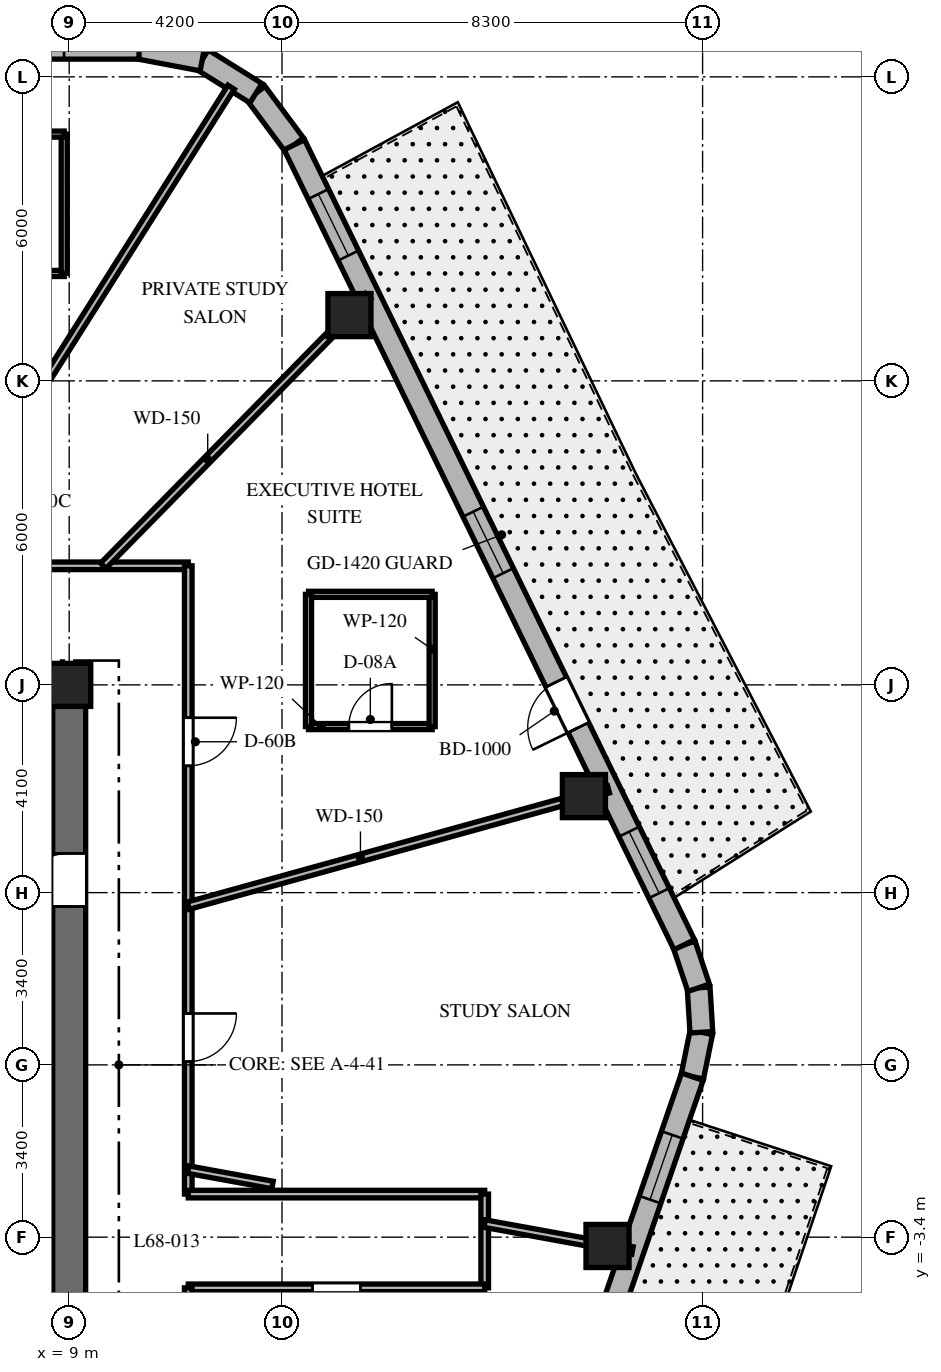
"""IFC4 building model, lengths in metres.
Left out: names, types, materials, properties, quantities, classifications, styles, units other than length and angle.
Written with IfcOpenShell. Run it as: python <this file> out.ifc"""

import sys

from ifc_helpers import new_model, si_unit, direction, frame, frame_2d, origin, origin_2d, place, context, subcontext, project, spatial, rectangle, extrude, element, fill, save


model = new_model("IFC4")
c1 = context("Model", 3, precision=1e-05, world=origin(), true_north=direction((0.0, 1.0)))
c2 = subcontext(c1, "Body", "Model", "MODEL_VIEW")
j1 = project(units=[si_unit("LENGTHUNIT", "METRE"), si_unit("PLANEANGLEUNIT", "RADIAN")], contexts=[c1])
p1 = place(None, origin())
s1 = spatial("IfcSite", under=j1, at=p1, CompositionType="ELEMENT")
p2 = place(p1, origin())
s2 = spatial("IfcBuilding", under=s1, at=p2, CompositionType="ELEMENT")
p3 = place(p2, frame((0.0, 0.0, 273.0)))
s3 = spatial("IfcBuildingStorey", under=s2, at=p3, CompositionType="ELEMENT", Elevation=273.0)
p4 = place(p3, frame((1.85, 7.5, 0.0), z_axis=(0.0, 0.0, 1.0), x_axis=(1.0, 0.0, 0.0)))
e1 = element("IfcWall", 1, at=p4, inside=s3, PredefinedType="SHEAR", context=c2, shape_type="SweptSolid", body=[
    extrude(rectangle(XDim=7.475, YDim=0.65, at=frame_2d((3.737, 0.0))), origin(), (0.0, 0.0, 1.0), 3.9),
])
p5 = place(p3, frame((9.0, -7.175, 0.0), z_axis=(0.0, 0.0, 1.0), x_axis=(0.0, 1.0, 0.0)))
e2 = element("IfcWall", 2, at=p5, inside=s3, PredefinedType="SHEAR", context=c2, shape_type="SweptSolid", body=[
    extrude(rectangle(XDim=14.35, YDim=0.65, at=frame_2d((7.175, 0.0))), origin(), (0.0, 0.0, 1.0), 3.9),
])
p6 = place(p5, frame((10.3, 0.0, 0.0)))
e3 = element("IfcOpeningElement", 3, at=p6, cuts=e2, PredefinedType="OPENING", context=c2, shape_type="SweptSolid", body=[
    extrude(rectangle(XDim=1.05, YDim=2.15, at=frame_2d((0.525, 1.075))), frame((0.0, 0.335, 0.0), z_axis=(0.0, -1.0, 0.0), x_axis=(1.0, 0.0, 0.0)), (0.0, 0.0, 1.0), 0.67),
])
for number, where, z_axis, x_axis in (
    (4, (9.0, 7.5, 0.0), (0.0, 0.0, 1.0), (1.0, 0.0, 0.0)),
    (5, (19.624, -3.574, 0.0), (0.0, 0.0, 1.0), (1.0, 0.0, 0.0)),
    (6, (19.158, 5.305, 0.0), (0.0, 0.0, 1.0), (1.0, 0.0, 0.0)),
    (7, (14.531, 14.798, 0.0), (0.0, 0.0, 1.0), (1.0, 0.0, 0.0)),
):
    element("IfcColumn", number, at=place(p3, frame(where, z_axis=z_axis, x_axis=x_axis)), inside=s3, PredefinedType="COLUMN", context=c2, shape_type="SweptSolid", body=[
        extrude(rectangle(XDim=0.85, YDim=0.85, at=origin_2d()), origin(), (0.0, 0.0, 1.0), 3.9),
    ])
p7 = place(p3, frame((21.298, -0.233, 0.0), z_axis=(0.0, 0.0, 1.0), x_axis=(0.199158176661, 0.979967356941, 0.0)))
e8 = element("IfcWall", 8, at=p7, inside=s3, PredefinedType="SOLIDWALL", context=c2, shape_type="SweptSolid", body=[
    extrude(rectangle(XDim=0.895, YDim=0.45, at=frame_2d((0.447, 0.0))), origin(), (0.0, 0.0, 1.0), 3.6),
])
p8 = place(p3, frame((21.476, 0.644, 0.0), z_axis=(0.0, 0.0, 1.0), x_axis=(-0.061031097918, 0.998135865044, 0.0)))
e9 = element("IfcWall", 9, at=p8, inside=s3, PredefinedType="SOLIDWALL", context=c2, shape_type="SweptSolid", body=[
    extrude(rectangle(XDim=0.88, YDim=0.45, at=frame_2d((0.44, 0.0))), origin(), (0.0, 0.0, 1.0), 3.6),
])
p9 = place(p3, frame((21.422, 1.522, 0.0), z_axis=(0.0, 0.0, 1.0), x_axis=(-0.316964162323, 0.94843751497, 0.0)))
e10 = element("IfcWall", 10, at=p9, inside=s3, PredefinedType="SOLIDWALL", context=c2, shape_type="SweptSolid", body=[
    extrude(rectangle(XDim=0.895, YDim=0.45, at=frame_2d((0.448, 0.0))), origin(), (0.0, 0.0, 1.0), 3.6),
])
p10 = place(p3, frame((13.443, 18.16, 0.0), z_axis=(0.0, 0.0, 1.0), x_axis=(-0.597042425808, 0.802209661987, 0.0)))
e11 = element("IfcWall", 11, at=p10, inside=s3, PredefinedType="SOLIDWALL", context=c2, shape_type="SweptSolid", body=[
    extrude(rectangle(XDim=1.27, YDim=0.45, at=frame_2d((0.635, 0.0))), origin(), (0.0, 0.0, 1.0), 3.6),
])
p11 = place(p3, frame((12.685, 19.178, 0.0), z_axis=(0.0, 0.0, 1.0), x_axis=(-0.848031272749, 0.529946186362, 0.0)))
e12 = element("IfcWall", 12, at=p11, inside=s3, PredefinedType="SOLIDWALL", context=c2, shape_type="SweptSolid", body=[
    extrude(rectangle(XDim=1.248, YDim=0.45, at=frame_2d((0.624, 0.0))), origin(), (0.0, 0.0, 1.0), 3.6),
])
p12 = place(p3, frame((11.626, 19.84, 0.0), z_axis=(0.0, 0.0, 1.0), x_axis=(-0.982701956681, 0.185194126083, 0.0)))
e13 = element("IfcWall", 13, at=p12, inside=s3, PredefinedType="SOLIDWALL", context=c2, shape_type="SweptSolid", body=[
    extrude(rectangle(XDim=1.27, YDim=0.45, at=frame_2d((0.635, 0.0))), origin(), (0.0, 0.0, 1.0), 3.6),
])
p13 = place(p3, frame((15.26, -17.776, 0.0), z_axis=(0.0, 0.0, 1.0), x_axis=(0.325407437101, 0.945573899745, 0.0)))
e14 = element("IfcWall", 14, at=p13, inside=s3, PredefinedType="SOLIDWALL", context=c2, shape_type="SweptSolid", body=[
    extrude(rectangle(XDim=18.552, YDim=0.45, at=frame_2d((9.276, 0.0))), origin(), (0.0, 0.0, 1.0), 3.6),
])
p14 = place(p13, frame((4.602, 0.0, 0.0)))
e15 = element("IfcOpeningElement", 15, at=p14, cuts=e14, PredefinedType="OPENING", context=c2, shape_type="SweptSolid", body=[
    extrude(rectangle(XDim=0.95, YDim=2.15, at=frame_2d((0.475, 1.075))), frame((0.0, 0.235, 0.0), z_axis=(0.0, -1.0, 0.0), x_axis=(1.0, 0.0, 0.0)), (0.0, 0.0, 1.0), 0.47),
])
p15 = place(p13, frame((1.161, 0.0, 0.8)))
e16 = element("IfcOpeningElement", 16, at=p15, cuts=e14, PredefinedType="OPENING", context=c2, shape_type="SweptSolid", body=[
    extrude(rectangle(XDim=1.35, YDim=1.75, at=frame_2d((0.675, 0.875))), frame((0.0, 0.235, 0.0), z_axis=(0.0, -1.0, 0.0), x_axis=(1.0, 0.0, 0.0)), (0.0, 0.0, 1.0), 0.47),
])
p16 = place(p13, frame((8.548, 0.0, 0.8)))
e17 = element("IfcOpeningElement", 17, at=p16, cuts=e14, PredefinedType="OPENING", context=c2, shape_type="SweptSolid", body=[
    extrude(rectangle(XDim=1.35, YDim=1.75, at=frame_2d((0.675, 0.875))), frame((0.0, 0.235, 0.0), z_axis=(0.0, -1.0, 0.0), x_axis=(1.0, 0.0, 0.0)), (0.0, 0.0, 1.0), 0.47),
])
p17 = place(p13, frame((15.987, 0.0, 0.8)))
e18 = element("IfcOpeningElement", 18, at=p17, cuts=e14, PredefinedType="OPENING", context=c2, shape_type="SweptSolid", body=[
    extrude(rectangle(XDim=1.35, YDim=1.75, at=frame_2d((0.675, 0.875))), frame((0.0, 0.235, 0.0), z_axis=(0.0, -1.0, 0.0), x_axis=(1.0, 0.0, 0.0)), (0.0, 0.0, 1.0), 0.47),
])
p18 = place(p3, frame((21.138, 2.371, 0.0), z_axis=(0.0, 0.0, 1.0), x_axis=(-0.438128124058, 0.89891253574, 0.0)))
e19 = element("IfcWall", 19, at=p18, inside=s3, PredefinedType="SOLIDWALL", context=c2, shape_type="SweptSolid", body=[
    extrude(rectangle(XDim=17.565, YDim=0.45, at=frame_2d((8.782, 0.0))), origin(), (0.0, 0.0, 1.0), 3.6),
])
p19 = place(p18, frame((4.769, 0.0, 0.0)))
e20 = element("IfcOpeningElement", 20, at=p19, cuts=e19, PredefinedType="OPENING", context=c2, shape_type="SweptSolid", body=[
    extrude(rectangle(XDim=1.0, YDim=2.15, at=frame_2d((0.5, 1.075))), frame((0.0, 0.235, 0.0), z_axis=(0.0, -1.0, 0.0), x_axis=(1.0, 0.0, 0.0)), (0.0, 0.0, 1.0), 0.47),
])
p20 = place(p18, frame((8.158, 0.0, 0.8)))
e21 = element("IfcOpeningElement", 21, at=p20, cuts=e19, PredefinedType="OPENING", context=c2, shape_type="SweptSolid", body=[
    extrude(rectangle(XDim=1.35, YDim=1.75, at=frame_2d((0.675, 0.875))), frame((0.0, 0.235, 0.0), z_axis=(0.0, -1.0, 0.0), x_axis=(1.0, 0.0, 0.0)), (0.0, 0.0, 1.0), 0.47),
])
p21 = place(p18, frame((15.132, 0.0, 0.8)))
e22 = element("IfcOpeningElement", 22, at=p21, cuts=e19, PredefinedType="OPENING", context=c2, shape_type="SweptSolid", body=[
    extrude(rectangle(XDim=1.35, YDim=1.75, at=frame_2d((0.675, 0.875))), frame((0.0, 0.235, 0.0), z_axis=(0.0, -1.0, 0.0), x_axis=(1.0, 0.0, 0.0)), (0.0, 0.0, 1.0), 0.47),
])
p22 = place(p18, frame((1.133, 0.0, 0.8)))
e23 = element("IfcOpeningElement", 23, at=p22, cuts=e19, PredefinedType="OPENING", context=c2, shape_type="SweptSolid", body=[
    extrude(rectangle(XDim=1.35, YDim=1.75, at=frame_2d((0.675, 0.875))), frame((0.0, 0.235, 0.0), z_axis=(0.0, -1.0, 0.0), x_axis=(1.0, 0.0, 0.0)), (0.0, 0.0, 1.0), 0.47),
])
p23 = place(p3, frame((10.379, 20.075, 0.0), z_axis=(0.0, 0.0, 1.0), x_axis=(-1.0, 0.0, 0.0)))
e24 = element("IfcWall", 24, at=p23, inside=s3, PredefinedType="SOLIDWALL", context=c2, shape_type="SweptSolid", body=[
    extrude(rectangle(XDim=22.417, YDim=0.45, at=frame_2d((11.208, 0.0))), origin(), (0.0, 0.0, 1.0), 3.6),
])
p24 = place(p23, frame((1.48, 0.0, 0.8)))
e25 = element("IfcOpeningElement", 25, at=p24, cuts=e24, PredefinedType="OPENING", context=c2, shape_type="SweptSolid", body=[
    extrude(rectangle(XDim=1.35, YDim=1.75, at=frame_2d((0.675, 0.875))), frame((0.0, 0.235, 0.0), z_axis=(0.0, -1.0, 0.0), x_axis=(1.0, 0.0, 0.0)), (0.0, 0.0, 1.0), 0.47),
])
p25 = place(p23, frame((10.534, 0.0, 0.8)))
e26 = element("IfcOpeningElement", 26, at=p25, cuts=e24, PredefinedType="OPENING", context=c2, shape_type="SweptSolid", body=[
    extrude(rectangle(XDim=1.35, YDim=1.75, at=frame_2d((0.675, 0.875))), frame((0.0, 0.235, 0.0), z_axis=(0.0, -1.0, 0.0), x_axis=(1.0, 0.0, 0.0)), (0.0, 0.0, 1.0), 0.47),
])
p26 = place(p23, frame((19.587, 0.0, 0.8)))
e27 = element("IfcOpeningElement", 27, at=p26, cuts=e24, PredefinedType="OPENING", context=c2, shape_type="SweptSolid", body=[
    extrude(rectangle(XDim=1.35, YDim=1.75, at=frame_2d((0.675, 0.875))), frame((0.0, 0.235, 0.0), z_axis=(0.0, -1.0, 0.0), x_axis=(1.0, 0.0, 0.0)), (0.0, 0.0, 1.0), 0.47),
])
p27 = place(p3, frame((0.92, 9.85, 0.0), z_axis=(0.0, 0.0, 1.0), x_axis=(1.0, 0.0, 0.0)))
e28 = element("IfcWall", 28, at=p27, inside=s3, PredefinedType="PARTITIONING", context=c2, shape_type="SweptSolid", body=[
    extrude(rectangle(XDim=10.43, YDim=0.15, at=frame_2d((5.215, 0.0))), origin(), (0.0, 0.0, 1.0), 3.09),
])
p28 = place(p27, frame((6.627, 0.0, 0.0)))
e29 = element("IfcOpeningElement", 29, at=p28, cuts=e28, PredefinedType="OPENING", context=c2, shape_type="SweptSolid", body=[
    extrude(rectangle(XDim=0.9, YDim=2.03, at=frame_2d((0.45, 1.015))), frame((0.0, 0.085, 0.0), z_axis=(0.0, -1.0, 0.0), x_axis=(1.0, 0.0, 0.0)), (0.0, 0.0, 1.0), 0.17),
])
p29 = place(p27, frame((3.226, 0.0, 0.0)))
e30 = element("IfcOpeningElement", 30, at=p29, cuts=e28, PredefinedType="OPENING", context=c2, shape_type="SweptSolid", body=[
    extrude(rectangle(XDim=0.95, YDim=2.03, at=frame_2d((0.475, 1.015))), frame((0.0, 0.085, 0.0), z_axis=(0.0, -1.0, 0.0), x_axis=(1.0, 0.0, 0.0)), (0.0, 0.0, 1.0), 0.17),
])
p30 = place(p3, frame((11.35, 9.85, 0.0), z_axis=(0.0, 0.0, 1.0), x_axis=(0.0, -1.0, 0.0)))
e31 = element("IfcWall", 31, at=p30, inside=s3, PredefinedType="PARTITIONING", context=c2, shape_type="SweptSolid", body=[
    extrude(rectangle(XDim=12.4, YDim=0.15, at=frame_2d((6.2, 0.0))), origin(), (0.0, 0.0, 1.0), 3.09),
])
p31 = place(p30, frame((2.998, 0.0, 0.0)))
e32 = element("IfcOpeningElement", 32, at=p31, cuts=e31, PredefinedType="OPENING", context=c2, shape_type="SweptSolid", body=[
    extrude(rectangle(XDim=0.95, YDim=2.03, at=frame_2d((0.475, 1.015))), frame((0.0, 0.085, 0.0), z_axis=(0.0, -1.0, 0.0), x_axis=(1.0, 0.0, 0.0)), (0.0, 0.0, 1.0), 0.17),
])
p32 = place(p30, frame((8.835, 0.0, 0.0)))
e33 = element("IfcOpeningElement", 33, at=p32, cuts=e31, PredefinedType="OPENING", context=c2, shape_type="SweptSolid", body=[
    extrude(rectangle(XDim=0.95, YDim=2.03, at=frame_2d((0.475, 1.015))), frame((0.0, 0.085, 0.0), z_axis=(0.0, -1.0, 0.0), x_axis=(1.0, 0.0, 0.0)), (0.0, 0.0, 1.0), 0.17),
])
p33 = place(p3, frame((11.35, -2.55, 0.0), z_axis=(0.0, 0.0, 1.0), x_axis=(1.0, 0.0, 0.0)))
e34 = element("IfcWall", 34, at=p33, inside=s3, PredefinedType="PARTITIONING", context=c2, shape_type="SweptSolid", body=[
    extrude(rectangle(XDim=5.85, YDim=0.15, at=frame_2d((2.925, 0.0))), origin(), (0.0, 0.0, 1.0), 3.041),
])
p34 = place(p3, frame((17.2, -2.55, 0.0), z_axis=(0.0, 0.0, 1.0), x_axis=(0.0, -1.0, 0.0)))
e35 = element("IfcWall", 35, at=p34, inside=s3, PredefinedType="PARTITIONING", context=c2, shape_type="SweptSolid", body=[
    extrude(rectangle(XDim=1.85, YDim=0.15, at=frame_2d((0.925, 0.0))), origin(), (0.0, 0.0, 1.0), 3.09),
])
p35 = place(p3, frame((17.2, -4.4, 0.0), z_axis=(0.0, 0.0, 1.0), x_axis=(-1.0, 0.0, 0.0)))
e36 = element("IfcWall", 36, at=p35, inside=s3, PredefinedType="PARTITIONING", context=c2, shape_type="SweptSolid", body=[
    extrude(rectangle(XDim=5.85, YDim=0.15, at=frame_2d((2.925, 0.0))), origin(), (0.0, 0.0, 1.0), 3.041),
])
p36 = place(p35, frame((2.45, 0.0, 0.0)))
e37 = element("IfcOpeningElement", 37, at=p36, cuts=e36, PredefinedType="OPENING", context=c2, shape_type="SweptSolid", body=[
    extrude(rectangle(XDim=0.95, YDim=2.03, at=frame_2d((0.475, 1.015))), frame((0.0, 0.085, 0.0), z_axis=(0.0, -1.0, 0.0), x_axis=(1.0, 0.0, 0.0)), (0.0, 0.0, 1.0), 0.17),
])
p37 = place(p3, frame((11.35, -4.4, 0.0), z_axis=(0.0, 0.0, 1.0), x_axis=(0.0, -1.0, 0.0)))
e38 = element("IfcWall", 38, at=p37, inside=s3, PredefinedType="PARTITIONING", context=c2, shape_type="SweptSolid", body=[
    extrude(rectangle(XDim=5.45, YDim=0.15, at=frame_2d((2.725, 0.0))), origin(), (0.0, 0.0, 1.0), 3.09),
])
p38 = place(p3, frame((11.35, 3.143, 0.0), z_axis=(0.0, 0.0, 1.0), x_axis=(0.963731818141, 0.266872596386, 0.0)))
e39 = element("IfcWall", 39, at=p38, inside=s3, PredefinedType="PARTITIONING", context=c2, shape_type="SweptSolid", body=[
    extrude(rectangle(XDim=8.605, YDim=0.15, at=frame_2d((4.302, 0.0))), origin(), (0.0, 0.0, 1.0), 2.94),
])
p39 = place(p3, frame((9.672, 9.85, 0.0), z_axis=(0.0, 0.0, 1.0), x_axis=(0.700629771301, 0.713524998558, 0.0)))
e40 = element("IfcWall", 40, at=p39, inside=s3, PredefinedType="PARTITIONING", context=c2, shape_type="SweptSolid", body=[
    extrude(rectangle(XDim=7.459, YDim=0.15, at=frame_2d((3.73, 0.0))), origin(), (0.0, 0.0, 1.0), 2.94),
])
p40 = place(p3, frame((6.226, 9.85, 0.0), z_axis=(0.0, 0.0, 1.0), x_axis=(0.53429711317, 0.845296749584, 0.0)))
e41 = element("IfcWall", 41, at=p40, inside=s3, PredefinedType="PARTITIONING", context=c2, shape_type="SweptSolid", body=[
    extrude(rectangle(XDim=11.174, YDim=0.15, at=frame_2d((5.587, 0.0))), origin(), (0.0, 0.0, 1.0), 2.94),
])
p41 = place(p3, frame((11.35, -2.067, 0.0), z_axis=(0.0, 0.0, 1.0), x_axis=(0.983807459651, -0.179228575665, 0.0)))
e42 = element("IfcWall", 42, at=p41, inside=s3, PredefinedType="PARTITIONING", context=c2, shape_type="SweptSolid", body=[
    extrude(rectangle(XDim=1.69, YDim=0.15, at=frame_2d((0.845, 0.0))), origin(), (0.0, 0.0, 1.0), 3.6),
])
p42 = place(p3, frame((17.2, -3.133, 0.0), z_axis=(0.0, 0.0, 1.0), x_axis=(0.983817168797, -0.179175272791, 0.0)))
e43 = element("IfcWall", 43, at=p42, inside=s3, PredefinedType="PARTITIONING", context=c2, shape_type="SweptSolid", body=[
    extrude(rectangle(XDim=2.965, YDim=0.15, at=frame_2d((1.482, 0.0))), origin(), (0.0, 0.0, 1.0), 2.94),
])
p43 = place(p3, frame((13.723, 6.677, 0.0), z_axis=(0.0, 0.0, 1.0), x_axis=(1.0, 0.0, 0.0)))
e44 = element("IfcWall", 44, at=p43, inside=s3, PredefinedType="PARTITIONING", context=c2, shape_type="SweptSolid", body=[
    extrude(rectangle(XDim=2.44, YDim=0.12, at=frame_2d((1.22, 0.0))), origin(), (0.0, 0.0, 1.0), 3.126),
])
p44 = place(p43, frame((0.795, 0.0, 0.0)))
e45 = element("IfcOpeningElement", 45, at=p44, cuts=e44, PredefinedType="OPENING", context=c2, shape_type="SweptSolid", body=[
    extrude(rectangle(XDim=0.85, YDim=2.03, at=frame_2d((0.425, 1.015))), frame((0.0, 0.07, 0.0), z_axis=(0.0, -1.0, 0.0), x_axis=(1.0, 0.0, 0.0)), (0.0, 0.0, 1.0), 0.14),
])
p45 = place(p3, frame((16.163, 6.677, 0.0), z_axis=(0.0, 0.0, 1.0), x_axis=(0.0, 1.0, 0.0)))
e46 = element("IfcWall", 46, at=p45, inside=s3, PredefinedType="PARTITIONING", context=c2, shape_type="SweptSolid", body=[
    extrude(rectangle(XDim=2.61, YDim=0.12, at=frame_2d((1.305, 0.0))), origin(), (0.0, 0.0, 1.0), 3.6),
])
p46 = place(p3, frame((16.163, 9.287, 0.0), z_axis=(0.0, 0.0, 1.0), x_axis=(-1.0, 0.0, 0.0)))
e47 = element("IfcWall", 47, at=p46, inside=s3, PredefinedType="PARTITIONING", context=c2, shape_type="SweptSolid", body=[
    extrude(rectangle(XDim=2.44, YDim=0.12, at=frame_2d((1.22, 0.0))), origin(), (0.0, 0.0, 1.0), 3.126),
])
p47 = place(p3, frame((13.723, 9.287, 0.0), z_axis=(0.0, 0.0, 1.0), x_axis=(0.0, -1.0, 0.0)))
e48 = element("IfcWall", 48, at=p47, inside=s3, PredefinedType="PARTITIONING", context=c2, shape_type="SweptSolid", body=[
    extrude(rectangle(XDim=2.61, YDim=0.12, at=frame_2d((1.305, 0.0))), origin(), (0.0, 0.0, 1.0), 3.6),
])
p48 = place(p3, frame((6.302, 15.62, 0.0), z_axis=(0.0, 0.0, 1.0), x_axis=(1.0, 0.0, 0.0)))
e49 = element("IfcWall", 49, at=p48, inside=s3, PredefinedType="PARTITIONING", context=c2, shape_type="SweptSolid", body=[
    extrude(rectangle(XDim=2.6, YDim=0.12, at=frame_2d((1.3, 0.0))), origin(), (0.0, 0.0, 1.0), 3.6),
])
p49 = place(p48, frame((0.875, 0.0, 0.0)))
e50 = element("IfcOpeningElement", 50, at=p49, cuts=e49, PredefinedType="OPENING", context=c2, shape_type="SweptSolid", body=[
    extrude(rectangle(XDim=0.85, YDim=2.03, at=frame_2d((0.425, 1.015))), frame((0.0, 0.07, 0.0), z_axis=(0.0, -1.0, 0.0), x_axis=(1.0, 0.0, 0.0)), (0.0, 0.0, 1.0), 0.14),
])
p50 = place(p3, frame((8.902, 15.62, 0.0), z_axis=(0.0, 0.0, 1.0), x_axis=(0.0, 1.0, 0.0)))
e51 = element("IfcWall", 51, at=p50, inside=s3, PredefinedType="PARTITIONING", context=c2, shape_type="SweptSolid", body=[
    extrude(rectangle(XDim=2.75, YDim=0.12, at=frame_2d((1.375, 0.0))), origin(), (0.0, 0.0, 1.0), 2.94),
])
p51 = place(p3, frame((8.902, 18.37, 0.0), z_axis=(0.0, 0.0, 1.0), x_axis=(-1.0, 0.0, 0.0)))
e52 = element("IfcWall", 52, at=p51, inside=s3, PredefinedType="PARTITIONING", context=c2, shape_type="SweptSolid", body=[
    extrude(rectangle(XDim=2.6, YDim=0.12, at=frame_2d((1.3, 0.0))), origin(), (0.0, 0.0, 1.0), 2.94),
])
p52 = place(p17, origin())
e53 = element("IfcWindow", 53, at=p52, inside=s3, PartitioningType="SINGLE_PANEL", PredefinedType="WINDOW", context=c2, shape_type="SweptSolid", body=[
    extrude(rectangle(XDim=1.35, YDim=1.75, at=frame_2d((0.675, 0.875))), frame((0.0, 0.03, 0.0), z_axis=(0.0, -1.0, 0.0), x_axis=(1.0, 0.0, 0.0)), (0.0, 0.0, 1.0), 0.06),
])
fill(e18, e53)
p53 = place(p19, origin())
e54 = element("IfcDoor", 54, at=p53, inside=s3, OperationType="SINGLE_SWING_LEFT", PredefinedType="DOOR", context=c2, shape_type="SweptSolid", body=[
    extrude(rectangle(XDim=1.0, YDim=2.15, at=frame_2d((0.5, 1.075))), frame((0.0, 0.025, 0.0), z_axis=(0.0, -1.0, 0.0), x_axis=(1.0, 0.0, 0.0)), (0.0, 0.0, 1.0), 0.05),
])
fill(e20, e54)
p54 = place(p20, origin())
e55 = element("IfcWindow", 55, at=p54, inside=s3, PartitioningType="SINGLE_PANEL", PredefinedType="WINDOW", context=c2, shape_type="SweptSolid", body=[
    extrude(rectangle(XDim=1.35, YDim=1.75, at=frame_2d((0.675, 0.875))), frame((0.0, 0.03, 0.0), z_axis=(0.0, -1.0, 0.0), x_axis=(1.0, 0.0, 0.0)), (0.0, 0.0, 1.0), 0.06),
])
fill(e21, e55)
p55 = place(p21, origin())
e56 = element("IfcWindow", 56, at=p55, inside=s3, PartitioningType="SINGLE_PANEL", PredefinedType="WINDOW", context=c2, shape_type="SweptSolid", body=[
    extrude(rectangle(XDim=1.35, YDim=1.75, at=frame_2d((0.675, 0.875))), frame((0.0, 0.03, 0.0), z_axis=(0.0, -1.0, 0.0), x_axis=(1.0, 0.0, 0.0)), (0.0, 0.0, 1.0), 0.06),
])
fill(e22, e56)
p56 = place(p22, origin())
e57 = element("IfcWindow", 57, at=p56, inside=s3, PartitioningType="SINGLE_PANEL", PredefinedType="WINDOW", context=c2, shape_type="SweptSolid", body=[
    extrude(rectangle(XDim=1.35, YDim=1.75, at=frame_2d((0.675, 0.875))), frame((0.0, 0.03, 0.0), z_axis=(0.0, -1.0, 0.0), x_axis=(1.0, 0.0, 0.0)), (0.0, 0.0, 1.0), 0.06),
])
fill(e23, e57)
p57 = place(p6, origin())
e58 = element("IfcDoor", 58, at=p57, inside=s3, OperationType="SINGLE_SWING_LEFT", PredefinedType="DOOR", context=c2, shape_type="SweptSolid", body=[
    extrude(rectangle(XDim=1.05, YDim=2.15, at=frame_2d((0.525, 1.075))), frame((0.0, 0.025, 0.0), z_axis=(0.0, -1.0, 0.0), x_axis=(1.0, 0.0, 0.0)), (0.0, 0.0, 1.0), 0.05),
])
fill(e3, e58)
p58 = place(p31, origin())
e59 = element("IfcDoor", 59, at=p58, inside=s3, OperationType="SINGLE_SWING_LEFT", PredefinedType="DOOR", context=c2, shape_type="SweptSolid", body=[
    extrude(rectangle(XDim=0.95, YDim=2.03, at=frame_2d((0.475, 1.015))), frame((0.0, 0.025, 0.0), z_axis=(0.0, -1.0, 0.0), x_axis=(1.0, 0.0, 0.0)), (0.0, 0.0, 1.0), 0.05),
])
fill(e32, e59)
p59 = place(p44, origin())
e60 = element("IfcDoor", 60, at=p59, inside=s3, OperationType="SINGLE_SWING_RIGHT", PredefinedType="DOOR", context=c2, shape_type="SweptSolid", body=[
    extrude(rectangle(XDim=0.85, YDim=2.03, at=frame_2d((0.425, 1.015))), frame((0.0, 0.025, 0.0), z_axis=(0.0, -1.0, 0.0), x_axis=(1.0, 0.0, 0.0)), (0.0, 0.0, 1.0), 0.05),
])
fill(e45, e60)
p60 = place(p36, origin())
e61 = element("IfcDoor", 61, at=p60, inside=s3, OperationType="SINGLE_SWING_RIGHT", PredefinedType="DOOR", context=c2, shape_type="SweptSolid", body=[
    extrude(rectangle(XDim=0.95, YDim=2.03, at=frame_2d((0.475, 1.015))), frame((0.0, 0.025, 0.0), z_axis=(0.0, -1.0, 0.0), x_axis=(1.0, 0.0, 0.0)), (0.0, 0.0, 1.0), 0.05),
])
fill(e37, e61)
p61 = place(p32, origin())
e62 = element("IfcDoor", 62, at=p61, inside=s3, OperationType="SINGLE_SWING_LEFT", PredefinedType="DOOR", context=c2, shape_type="SweptSolid", body=[
    extrude(rectangle(XDim=0.95, YDim=2.03, at=frame_2d((0.475, 1.015))), frame((0.0, 0.025, 0.0), z_axis=(0.0, -1.0, 0.0), x_axis=(1.0, 0.0, 0.0)), (0.0, 0.0, 1.0), 0.05),
])
fill(e33, e62)
save(model, sys.argv[1])
